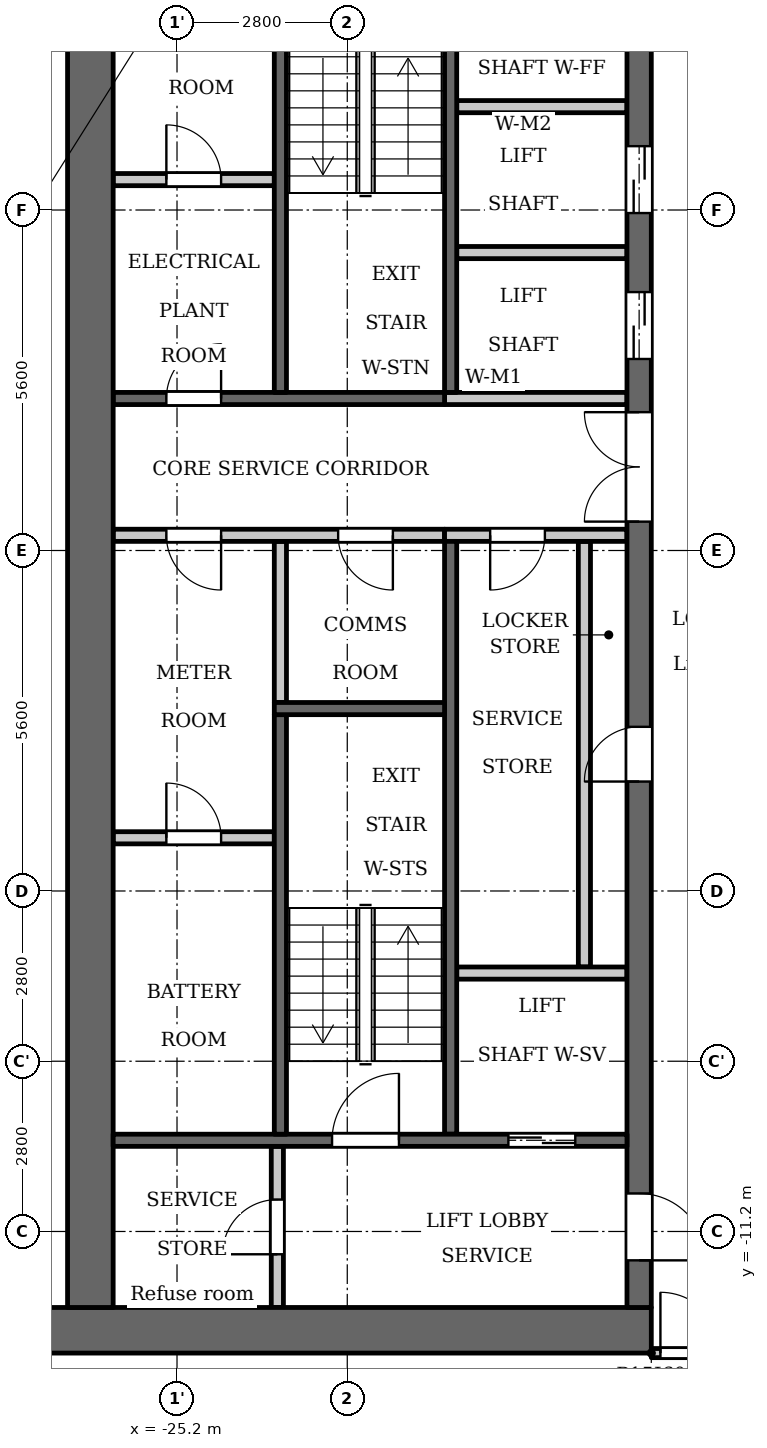
"""IFC4 building model, lengths in metres.
Left out: names, types, materials, properties, quantities, classifications, styles, units other than length and angle.
Written with IfcOpenShell. Run it as: python <this file> out.ifc"""

import sys

from ifc_helpers import new_model, si_unit, direction, frame, frame_2d, origin, place, context, subcontext, project, spatial, rectangle, extrude, element, fill, save


model = new_model("IFC4")
c1 = context("Model", 3, precision=1e-05, world=origin(), true_north=direction((0.0, 1.0)))
c2 = subcontext(c1, "Body", "Model", "MODEL_VIEW")
j1 = project(units=[si_unit("LENGTHUNIT", "METRE"), si_unit("PLANEANGLEUNIT", "RADIAN")], contexts=[c1])
p1 = place(None, origin())
s1 = spatial("IfcSite", under=j1, at=p1, CompositionType="ELEMENT")
p2 = place(p1, origin())
s2 = spatial("IfcBuilding", under=s1, at=p2, CompositionType="ELEMENT")
p3 = place(p2, frame((0.0, 0.0, 157.1)))
s3 = spatial("IfcBuildingStorey", under=s2, at=p3, CompositionType="ELEMENT", Elevation=157.1)
p4 = place(p3, frame((-23.5, -2.5, 0.0), z_axis=(0.0, 0.0, 1.0), x_axis=(0.0, 1.0, 0.0)))
e1 = element("IfcWall", 1, at=p4, inside=s3, PredefinedType="PARTITIONING", context=c2, shape_type="SweptSolid", body=[
    extrude(rectangle(XDim=2.65, YDim=0.2, at=frame_2d((1.325, 0.0))), origin(), (0.0, 0.0, 1.0), 3.2),
])
p5 = place(p3, frame((-20.7, 2.6, 0.0), z_axis=(0.0, 0.0, 1.0), x_axis=(0.0, 1.0, 0.0)))
e2 = element("IfcWall", 2, at=p5, inside=s3, PredefinedType="SHEAR", context=c2, shape_type="SweptSolid", body=[
    extrude(rectangle(XDim=7.0, YDim=0.2, at=frame_2d((3.5, 0.0))), origin(), (0.0, 0.0, 1.0), 3.2),
])
p6 = place(p3, frame((-20.7, -9.6, 0.0), z_axis=(0.0, 0.0, 1.0), x_axis=(0.0, 1.0, 0.0)))
e3 = element("IfcWall", 3, at=p6, inside=s3, PredefinedType="SHEAR", context=c2, shape_type="SweptSolid", body=[
    extrude(rectangle(XDim=9.75, YDim=0.2, at=frame_2d((4.875, 0.0))), origin(), (0.0, 0.0, 1.0), 3.2),
])
p7 = place(p3, frame((-20.8, 2.5, 0.0), z_axis=(0.0, 0.0, 1.0), x_axis=(-1.0, 0.0, 0.0)))
e4 = element("IfcWall", 4, at=p7, inside=s3, PredefinedType="SHEAR", context=c2, shape_type="SweptSolid", body=[
    extrude(rectangle(XDim=5.45, YDim=0.2, at=frame_2d((2.725, 0.0))), origin(), (0.0, 0.0, 1.0), 3.2),
])
p8 = place(p7, frame((3.675, 0.0, 0.0)))
e5 = element("IfcOpeningElement", 5, at=p8, cuts=e4, PredefinedType="OPENING", context=c2, shape_type="SweptSolid", body=[
    extrude(rectangle(XDim=0.9, YDim=2.1, at=frame_2d((0.45, 1.05))), frame((0.0, 0.11, 0.0), z_axis=(0.0, -1.0, 0.0), x_axis=(1.0, 0.0, 0.0)), (0.0, 0.0, 1.0), 0.22),
])
p9 = place(p3, frame((-20.8, 0.25, 0.0), z_axis=(0.0, 0.0, 1.0), x_axis=(-1.0, 0.0, 0.0)))
e6 = element("IfcWall", 6, at=p9, inside=s3, PredefinedType="PARTITIONING", context=c2, shape_type="SweptSolid", body=[
    extrude(rectangle(XDim=5.45, YDim=0.2, at=frame_2d((2.725, 0.0))), origin(), (0.0, 0.0, 1.0), 3.2),
])
p10 = place(p9, frame((0.85, 0.0, 0.0)))
e7 = element("IfcOpeningElement", 7, at=p10, cuts=e6, PredefinedType="OPENING", context=c2, shape_type="SweptSolid", body=[
    extrude(rectangle(XDim=0.9, YDim=2.1, at=frame_2d((0.45, 1.05))), frame((0.0, 0.11, 0.0), z_axis=(0.0, -1.0, 0.0), x_axis=(1.0, 0.0, 0.0)), (0.0, 0.0, 1.0), 0.22),
])
p11 = place(p9, frame((3.675, 0.0, 0.0)))
e8 = element("IfcOpeningElement", 8, at=p11, cuts=e6, PredefinedType="OPENING", context=c2, shape_type="SweptSolid", body=[
    extrude(rectangle(XDim=0.9, YDim=2.1, at=frame_2d((0.45, 1.05))), frame((0.0, 0.11, 0.0), z_axis=(0.0, -1.0, 0.0), x_axis=(1.0, 0.0, 0.0)), (0.0, 0.0, 1.0), 0.22),
])
p12 = place(p3, frame((-17.4, -12.825, 0.0), z_axis=(0.0, 0.0, 1.0), x_axis=(-1.0, 0.0, 0.0)))
e9 = element("IfcWall", 9, at=p12, inside=s3, PredefinedType="SHEAR", context=c2, shape_type="SweptSolid", body=[
    extrude(rectangle(XDim=10.4, YDim=0.75, at=frame_2d((5.2, 0.0))), origin(), (0.0, 0.0, 1.0), 3.2),
])
p13 = place(p3, frame((-18.5, -6.85, 0.0), z_axis=(0.0, 0.0, 1.0), x_axis=(0.0, 1.0, 0.0)))
e10 = element("IfcWall", 10, at=p13, inside=s3, PredefinedType="PARTITIONING", context=c2, shape_type="SweptSolid", body=[
    extrude(rectangle(XDim=7.0, YDim=0.2, at=frame_2d((3.5, 0.0))), origin(), (0.0, 0.0, 1.0), 3.2),
])
p14 = place(p3, frame((-17.6, -12.45, 0.0), z_axis=(0.0, 0.0, 1.0), x_axis=(0.0, 1.0, 0.0)))
e11 = element("IfcWall", 11, at=p14, inside=s3, PredefinedType="SHEAR", context=c2, shape_type="SweptSolid", body=[
    extrude(rectangle(XDim=24.9, YDim=0.4, at=frame_2d((12.45, 0.0))), origin(), (0.0, 0.0, 1.0), 3.2),
])
p15 = place(p14, frame((8.65, 0.0, 0.0)))
e12 = element("IfcOpeningElement", 12, at=p15, cuts=e11, PredefinedType="OPENING", context=c2, shape_type="SweptSolid", body=[
    extrude(rectangle(XDim=0.9, YDim=2.1, at=frame_2d((0.45, 1.05))), frame((0.0, 0.21, 0.0), z_axis=(0.0, -1.0, 0.0), x_axis=(1.0, 0.0, 0.0)), (0.0, 0.0, 1.0), 0.42),
])
p16 = place(p14, frame((15.6, 0.0, 0.0)))
e13 = element("IfcOpeningElement", 13, at=p16, cuts=e11, PredefinedType="OPENING", context=c2, shape_type="SweptSolid", body=[
    extrude(rectangle(XDim=1.1, YDim=2.1, at=frame_2d((0.55, 1.05))), frame((0.0, 0.21, 0.0), z_axis=(0.0, -1.0, 0.0), x_axis=(1.0, 0.0, 0.0)), (0.0, 0.0, 1.0), 0.42),
])
p17 = place(p14, frame((18.0, 0.0, 0.0)))
e14 = element("IfcOpeningElement", 14, at=p17, cuts=e11, PredefinedType="OPENING", context=c2, shape_type="SweptSolid", body=[
    extrude(rectangle(XDim=1.1, YDim=2.1, at=frame_2d((0.55, 1.05))), frame((0.0, 0.21, 0.0), z_axis=(0.0, -1.0, 0.0), x_axis=(1.0, 0.0, 0.0)), (0.0, 0.0, 1.0), 0.42),
])
p18 = place(p14, frame((23.025, 0.0, 0.0)))
e15 = element("IfcOpeningElement", 15, at=p18, cuts=e11, PredefinedType="OPENING", context=c2, shape_type="SweptSolid", body=[
    extrude(rectangle(XDim=1.1, YDim=2.1, at=frame_2d((0.55, 1.05))), frame((0.0, 0.21, 0.0), z_axis=(0.0, -1.0, 0.0), x_axis=(1.0, 0.0, 0.0)), (0.0, 0.0, 1.0), 0.42),
])
p19 = place(p14, frame((0.775, 0.0, 0.0)))
e16 = element("IfcOpeningElement", 16, at=p19, cuts=e11, PredefinedType="OPENING", context=c2, shape_type="SweptSolid", body=[
    extrude(rectangle(XDim=1.1, YDim=2.1, at=frame_2d((0.55, 1.05))), frame((0.0, 0.21, 0.0), z_axis=(0.0, -1.0, 0.0), x_axis=(1.0, 0.0, 0.0)), (0.0, 0.0, 1.0), 0.42),
])
p20 = place(p14, frame((12.925, 0.0, 0.0)))
e17 = element("IfcOpeningElement", 17, at=p20, cuts=e11, PredefinedType="OPENING", context=c2, shape_type="SweptSolid", body=[
    extrude(rectangle(XDim=1.8, YDim=2.1, at=frame_2d((0.9, 1.05))), frame((0.0, 0.21, 0.0), z_axis=(0.0, -1.0, 0.0), x_axis=(1.0, 0.0, 0.0)), (0.0, 0.0, 1.0), 0.42),
])
p21 = place(p3, frame((-26.625, -12.45, 0.0), z_axis=(0.0, 0.0, 1.0), x_axis=(0.0, 1.0, 0.0)))
e18 = element("IfcWall", 18, at=p21, inside=s3, PredefinedType="SHEAR", context=c2, shape_type="SweptSolid", body=[
    extrude(rectangle(XDim=24.9, YDim=0.75, at=frame_2d((12.45, 0.0))), origin(), (0.0, 0.0, 1.0), 3.2),
])
p22 = place(p3, frame((-23.55, -12.45, 0.0), z_axis=(0.0, 0.0, 1.0), x_axis=(0.0, 1.0, 0.0)))
e19 = element("IfcWall", 19, at=p22, inside=s3, PredefinedType="PARTITIONING", context=c2, shape_type="SweptSolid", body=[
    extrude(rectangle(XDim=2.65, YDim=0.2, at=frame_2d((1.325, 0.0))), origin(), (0.0, 0.0, 1.0), 3.2),
])
p23 = place(p22, frame((0.875, 0.0, 0.0)))
e20 = element("IfcOpeningElement", 20, at=p23, cuts=e19, PredefinedType="OPENING", context=c2, shape_type="SweptSolid", body=[
    extrude(rectangle(XDim=0.9, YDim=2.1, at=frame_2d((0.45, 1.05))), frame((0.0, 0.11, 0.0), z_axis=(0.0, -1.0, 0.0), x_axis=(1.0, 0.0, 0.0)), (0.0, 0.0, 1.0), 0.22),
])
p24 = place(p3, frame((-23.6, -4.725, 0.0), z_axis=(0.0, 0.0, 1.0), x_axis=(-1.0, 0.0, 0.0)))
e21 = element("IfcWall", 21, at=p24, inside=s3, PredefinedType="PARTITIONING", context=c2, shape_type="SweptSolid", body=[
    extrude(rectangle(XDim=2.65, YDim=0.2, at=frame_2d((1.325, 0.0))), origin(), (0.0, 0.0, 1.0), 3.2),
])
p25 = place(p24, frame((0.875, 0.0, 0.0)))
e22 = element("IfcOpeningElement", 22, at=p25, cuts=e21, PredefinedType="OPENING", context=c2, shape_type="SweptSolid", body=[
    extrude(rectangle(XDim=0.9, YDim=2.1, at=frame_2d((0.45, 1.05))), frame((0.0, 0.11, 0.0), z_axis=(0.0, -1.0, 0.0), x_axis=(1.0, 0.0, 0.0)), (0.0, 0.0, 1.0), 0.22),
])
p26 = place(p3, frame((-23.6, 6.1, 0.0), z_axis=(0.0, 0.0, 1.0), x_axis=(-1.0, 0.0, 0.0)))
e23 = element("IfcWall", 23, at=p26, inside=s3, PredefinedType="PARTITIONING", context=c2, shape_type="SweptSolid", body=[
    extrude(rectangle(XDim=2.65, YDim=0.2, at=frame_2d((1.325, 0.0))), origin(), (0.0, 0.0, 1.0), 3.2),
])
p27 = place(p26, frame((0.875, 0.0, 0.0)))
e24 = element("IfcOpeningElement", 24, at=p27, cuts=e23, PredefinedType="OPENING", context=c2, shape_type="SweptSolid", body=[
    extrude(rectangle(XDim=0.9, YDim=2.1, at=frame_2d((0.45, 1.05))), frame((0.0, 0.11, 0.0), z_axis=(0.0, -1.0, 0.0), x_axis=(1.0, 0.0, 0.0)), (0.0, 0.0, 1.0), 0.22),
])
p28 = place(p3, frame((-17.8, -9.7, 0.0), z_axis=(0.0, 0.0, 1.0), x_axis=(-1.0, 0.0, 0.0)))
e25 = element("IfcWall", 25, at=p28, inside=s3, PredefinedType="SHEAR", context=c2, shape_type="SweptSolid", body=[
    extrude(rectangle(XDim=8.45, YDim=0.2, at=frame_2d((4.225, 0.0))), origin(), (0.0, 0.0, 1.0), 3.2),
])
p29 = place(p28, frame((0.85, 0.0, 0.0)))
e26 = element("IfcOpeningElement", 26, at=p29, cuts=e25, PredefinedType="OPENING", context=c2, shape_type="SweptSolid", body=[
    extrude(rectangle(XDim=1.1, YDim=2.1, at=frame_2d((0.55, 1.05))), frame((0.0, 0.11, 0.0), z_axis=(0.0, -1.0, 0.0), x_axis=(1.0, 0.0, 0.0)), (0.0, 0.0, 1.0), 0.22),
])
p30 = place(p28, frame((3.75, 0.0, 0.0)))
e27 = element("IfcOpeningElement", 27, at=p30, cuts=e25, PredefinedType="OPENING", context=c2, shape_type="SweptSolid", body=[
    extrude(rectangle(XDim=1.1, YDim=2.1, at=frame_2d((0.55, 1.05))), frame((0.0, 0.11, 0.0), z_axis=(0.0, -1.0, 0.0), x_axis=(1.0, 0.0, 0.0)), (0.0, 0.0, 1.0), 0.22),
])
p31 = place(p3, frame((-17.8, -6.95, 0.0), z_axis=(0.0, 0.0, 1.0), x_axis=(-1.0, 0.0, 0.0)))
e28 = element("IfcWall", 28, at=p31, inside=s3, PredefinedType="PARTITIONING", context=c2, shape_type="SweptSolid", body=[
    extrude(rectangle(XDim=2.8, YDim=0.2, at=frame_2d((1.4, 0.0))), origin(), (0.0, 0.0, 1.0), 3.2),
])
p32 = place(p3, frame((-17.8, 0.25, 0.0), z_axis=(0.0, 0.0, 1.0), x_axis=(-1.0, 0.0, 0.0)))
e29 = element("IfcWall", 29, at=p32, inside=s3, PredefinedType="PARTITIONING", context=c2, shape_type="SweptSolid", body=[
    extrude(rectangle(XDim=3.0, YDim=0.2, at=frame_2d((1.5, 0.0))), origin(), (0.0, 0.0, 1.0), 3.2),
])
p33 = place(p32, frame((1.35, 0.0, 0.0)))
e30 = element("IfcOpeningElement", 30, at=p33, cuts=e29, PredefinedType="OPENING", context=c2, shape_type="SweptSolid", body=[
    extrude(rectangle(XDim=0.9, YDim=2.1, at=frame_2d((0.45, 1.05))), frame((0.0, 0.11, 0.0), z_axis=(0.0, -1.0, 0.0), x_axis=(1.0, 0.0, 0.0)), (0.0, 0.0, 1.0), 0.22),
])
p34 = place(p3, frame((-17.8, 2.5, 0.0), z_axis=(0.0, 0.0, 1.0), x_axis=(-1.0, 0.0, 0.0)))
e31 = element("IfcWall", 31, at=p34, inside=s3, PredefinedType="PARTITIONING", context=c2, shape_type="SweptSolid", body=[
    extrude(rectangle(XDim=3.0, YDim=0.2, at=frame_2d((1.5, 0.0))), origin(), (0.0, 0.0, 1.0), 3.2),
])
for number, where, z_axis, x_axis in (
    (32, (-17.8, 4.9, 0.0), (0.0, 0.0, 1.0), (-1.0, 0.0, 0.0)),
    (33, (-17.8, 7.3, 0.0), (0.0, 0.0, 1.0), (-1.0, 0.0, 0.0)),
):
    element("IfcWall", number, at=place(p3, frame(where, z_axis=z_axis, x_axis=x_axis)), inside=s3, PredefinedType="PARTITIONING", context=c2, shape_type="SweptSolid", body=[
        extrude(rectangle(XDim=2.8, YDim=0.2, at=frame_2d((1.4, 0.0))), origin(), (0.0, 0.0, 1.0), 3.2),
    ])
p35 = place(p3, frame((-23.5, 2.6, 0.0), z_axis=(0.0, 0.0, 1.0), x_axis=(0.0, 1.0, 0.0)))
e34 = element("IfcWall", 34, at=p35, inside=s3, PredefinedType="SHEAR", context=c2, shape_type="SweptSolid", body=[
    extrude(rectangle(XDim=7.0, YDim=0.2, at=frame_2d((3.5, 0.0))), origin(), (0.0, 0.0, 1.0), 3.2),
])
p36 = place(p3, frame((-23.5, -9.6, 0.0), z_axis=(0.0, 0.0, 1.0), x_axis=(0.0, 1.0, 0.0)))
e35 = element("IfcWall", 35, at=p36, inside=s3, PredefinedType="SHEAR", context=c2, shape_type="SweptSolid", body=[
    extrude(rectangle(XDim=6.9, YDim=0.2, at=frame_2d((3.45, 0.0))), origin(), (0.0, 0.0, 1.0), 3.2),
])
p37 = place(p3, frame((-20.8, -2.6, 0.0), z_axis=(0.0, 0.0, 1.0), x_axis=(-1.0, 0.0, 0.0)))
e36 = element("IfcWall", 36, at=p37, inside=s3, PredefinedType="SHEAR", context=c2, shape_type="SweptSolid", body=[
    extrude(rectangle(XDim=2.8, YDim=0.2, at=frame_2d((1.4, 0.0))), origin(), (0.0, 0.0, 1.0), 3.2),
])
p38 = place(p3, frame((-17.4, -13.2, 0.0), z_axis=(0.0, 0.0, 1.0), x_axis=(1.0, 0.0, 0.0)))
e37 = element("IfcWall", 37, at=p38, inside=s3, PredefinedType="PARTITIONING", context=c2, shape_type="SweptSolid", body=[
    extrude(rectangle(XDim=34.8, YDim=0.15, at=frame_2d((17.4, 0.0))), origin(), (0.0, 0.0, 1.0), 3.2),
])
p39 = place(p38, frame((0.15, 0.0, 0.0)))
e38 = element("IfcOpeningElement", 38, at=p39, cuts=e37, PredefinedType="OPENING", context=c2, shape_type="SweptSolid", body=[
    extrude(rectangle(XDim=1.0, YDim=2.1, at=frame_2d((0.5, 1.05))), frame((0.0, 0.085, 0.0), z_axis=(0.0, -1.0, 0.0), x_axis=(1.0, 0.0, 0.0)), (0.0, 0.0, 1.0), 0.17),
])
p40 = place(p38, frame((33.55, 0.0, 0.0)))
e39 = element("IfcOpeningElement", 39, at=p40, cuts=e37, PredefinedType="OPENING", context=c2, shape_type="SweptSolid", body=[
    extrude(rectangle(XDim=1.0, YDim=2.1, at=frame_2d((0.5, 1.05))), frame((0.0, 0.085, 0.0), z_axis=(0.0, -1.0, 0.0), x_axis=(1.0, 0.0, 0.0)), (0.0, 0.0, 1.0), 0.17),
])
p41 = place(p38, frame((3.5, 0.0, 0.0)))
e40 = element("IfcOpeningElement", 40, at=p41, cuts=e37, PredefinedType="OPENING", context=c2, shape_type="SweptSolid", body=[
    extrude(rectangle(XDim=1.0, YDim=2.1, at=frame_2d((0.5, 1.05))), frame((0.0, 0.085, 0.0), z_axis=(0.0, -1.0, 0.0), x_axis=(1.0, 0.0, 0.0)), (0.0, 0.0, 1.0), 0.17),
])
p42 = place(p38, frame((10.1, 0.0, 0.0)))
e41 = element("IfcOpeningElement", 41, at=p42, cuts=e37, PredefinedType="OPENING", context=c2, shape_type="SweptSolid", body=[
    extrude(rectangle(XDim=1.0, YDim=2.1, at=frame_2d((0.5, 1.05))), frame((0.0, 0.085, 0.0), z_axis=(0.0, -1.0, 0.0), x_axis=(1.0, 0.0, 0.0)), (0.0, 0.0, 1.0), 0.17),
])
p43 = place(p38, frame((15.7, 0.0, 0.0)))
e42 = element("IfcOpeningElement", 42, at=p43, cuts=e37, PredefinedType="OPENING", context=c2, shape_type="SweptSolid", body=[
    extrude(rectangle(XDim=1.0, YDim=2.1, at=frame_2d((0.5, 1.05))), frame((0.0, 0.085, 0.0), z_axis=(0.0, -1.0, 0.0), x_axis=(1.0, 0.0, 0.0)), (0.0, 0.0, 1.0), 0.17),
])
p44 = place(p38, frame((18.05, 0.0, 0.0)))
e43 = element("IfcOpeningElement", 43, at=p44, cuts=e37, PredefinedType="OPENING", context=c2, shape_type="SweptSolid", body=[
    extrude(rectangle(XDim=1.0, YDim=2.1, at=frame_2d((0.5, 1.05))), frame((0.0, 0.085, 0.0), z_axis=(0.0, -1.0, 0.0), x_axis=(1.0, 0.0, 0.0)), (0.0, 0.0, 1.0), 0.17),
])
p45 = place(p38, frame((26.9, 0.0, 0.0)))
e44 = element("IfcOpeningElement", 44, at=p45, cuts=e37, PredefinedType="OPENING", context=c2, shape_type="SweptSolid", body=[
    extrude(rectangle(XDim=1.0, YDim=2.1, at=frame_2d((0.5, 1.05))), frame((0.0, 0.085, 0.0), z_axis=(0.0, -1.0, 0.0), x_axis=(1.0, 0.0, 0.0)), (0.0, 0.0, 1.0), 0.17),
])
p46 = place(p29, origin())
e45 = element("IfcDoor", 45, at=p46, inside=s3, OperationType="DOUBLE_DOOR_SLIDING", PredefinedType="DOOR", context=c2, shape_type="SweptSolid", body=[
    extrude(rectangle(XDim=1.1, YDim=2.1, at=frame_2d((0.55, 1.05))), frame((0.0, 0.025, 0.0), z_axis=(0.0, -1.0, 0.0), x_axis=(1.0, 0.0, 0.0)), (0.0, 0.0, 1.0), 0.05),
])
fill(e26, e45)
p47 = place(p15, origin())
e46 = element("IfcDoor", 46, at=p47, inside=s3, OperationType="SINGLE_SWING_RIGHT", PredefinedType="DOOR", context=c2, shape_type="SweptSolid", body=[
    extrude(rectangle(XDim=0.9, YDim=2.1, at=frame_2d((0.45, 1.05))), frame((0.0, 0.025, 0.0), z_axis=(0.0, -1.0, 0.0), x_axis=(1.0, 0.0, 0.0)), (0.0, 0.0, 1.0), 0.05),
])
fill(e12, e46)
p48 = place(p33, origin())
e47 = element("IfcDoor", 47, at=p48, inside=s3, OperationType="SINGLE_SWING_LEFT", PredefinedType="DOOR", context=c2, shape_type="SweptSolid", body=[
    extrude(rectangle(XDim=0.9, YDim=2.1, at=frame_2d((0.45, 1.05))), frame((0.0, 0.025, 0.0), z_axis=(0.0, -1.0, 0.0), x_axis=(1.0, 0.0, 0.0)), (0.0, 0.0, 1.0), 0.05),
])
fill(e30, e47)
p49 = place(p16, origin())
e48 = element("IfcDoor", 48, at=p49, inside=s3, OperationType="DOUBLE_DOOR_SLIDING", PredefinedType="DOOR", context=c2, shape_type="SweptSolid", body=[
    extrude(rectangle(XDim=1.1, YDim=2.1, at=frame_2d((0.55, 1.05))), frame((0.0, 0.025, 0.0), z_axis=(0.0, -1.0, 0.0), x_axis=(1.0, 0.0, 0.0)), (0.0, 0.0, 1.0), 0.05),
])
fill(e13, e48)
p50 = place(p17, origin())
e49 = element("IfcDoor", 49, at=p50, inside=s3, OperationType="DOUBLE_DOOR_SLIDING", PredefinedType="DOOR", context=c2, shape_type="SweptSolid", body=[
    extrude(rectangle(XDim=1.1, YDim=2.1, at=frame_2d((0.55, 1.05))), frame((0.0, 0.025, 0.0), z_axis=(0.0, -1.0, 0.0), x_axis=(1.0, 0.0, 0.0)), (0.0, 0.0, 1.0), 0.05),
])
fill(e14, e49)
p51 = place(p19, origin())
e50 = element("IfcDoor", 50, at=p51, inside=s3, OperationType="SINGLE_SWING_LEFT", PredefinedType="DOOR", context=c2, shape_type="SweptSolid", body=[
    extrude(rectangle(XDim=1.1, YDim=2.1, at=frame_2d((0.55, 1.05))), frame((0.0, 0.025, 0.0), z_axis=(0.0, -1.0, 0.0), x_axis=(1.0, 0.0, 0.0)), (0.0, 0.0, 1.0), 0.05),
])
fill(e16, e50)
p52 = place(p23, origin())
e51 = element("IfcDoor", 51, at=p52, inside=s3, OperationType="SINGLE_SWING_RIGHT", PredefinedType="DOOR", context=c2, shape_type="SweptSolid", body=[
    extrude(rectangle(XDim=0.9, YDim=2.1, at=frame_2d((0.45, 1.05))), frame((0.0, 0.025, 0.0), z_axis=(0.0, -1.0, 0.0), x_axis=(1.0, 0.0, 0.0)), (0.0, 0.0, 1.0), 0.05),
])
fill(e20, e51)
p53 = place(p30, origin())
e52 = element("IfcDoor", 52, at=p53, inside=s3, OperationType="SINGLE_SWING_LEFT", PredefinedType="DOOR", context=c2, shape_type="SweptSolid", body=[
    extrude(rectangle(XDim=1.1, YDim=2.1, at=frame_2d((0.55, 1.05))), frame((0.0, 0.025, 0.0), z_axis=(0.0, -1.0, 0.0), x_axis=(1.0, 0.0, 0.0)), (0.0, 0.0, 1.0), 0.05),
])
fill(e27, e52)
p54 = place(p20, origin())
e53 = element("IfcDoor", 53, at=p54, inside=s3, OperationType="DOUBLE_DOOR_SINGLE_SWING", PredefinedType="DOOR", context=c2, shape_type="SweptSolid", body=[
    extrude(rectangle(XDim=1.8, YDim=2.1, at=frame_2d((0.9, 1.05))), frame((0.0, 0.025, 0.0), z_axis=(0.0, -1.0, 0.0), x_axis=(1.0, 0.0, 0.0)), (0.0, 0.0, 1.0), 0.05),
])
fill(e17, e53)
p55 = place(p10, origin())
e54 = element("IfcDoor", 54, at=p55, inside=s3, OperationType="SINGLE_SWING_RIGHT", PredefinedType="DOOR", context=c2, shape_type="SweptSolid", body=[
    extrude(rectangle(XDim=0.9, YDim=2.1, at=frame_2d((0.45, 1.05))), frame((0.0, 0.025, 0.0), z_axis=(0.0, -1.0, 0.0), x_axis=(1.0, 0.0, 0.0)), (0.0, 0.0, 1.0), 0.05),
])
fill(e7, e54)
p56 = place(p25, origin())
e55 = element("IfcDoor", 55, at=p56, inside=s3, OperationType="SINGLE_SWING_RIGHT", PredefinedType="DOOR", context=c2, shape_type="SweptSolid", body=[
    extrude(rectangle(XDim=0.9, YDim=2.1, at=frame_2d((0.45, 1.05))), frame((0.0, 0.025, 0.0), z_axis=(0.0, -1.0, 0.0), x_axis=(1.0, 0.0, 0.0)), (0.0, 0.0, 1.0), 0.05),
])
fill(e22, e55)
p57 = place(p11, origin())
e56 = element("IfcDoor", 56, at=p57, inside=s3, OperationType="SINGLE_SWING_RIGHT", PredefinedType="DOOR", context=c2, shape_type="SweptSolid", body=[
    extrude(rectangle(XDim=0.9, YDim=2.1, at=frame_2d((0.45, 1.05))), frame((0.0, 0.025, 0.0), z_axis=(0.0, -1.0, 0.0), x_axis=(1.0, 0.0, 0.0)), (0.0, 0.0, 1.0), 0.05),
])
fill(e8, e56)
p58 = place(p27, origin())
e57 = element("IfcDoor", 57, at=p58, inside=s3, OperationType="SINGLE_SWING_RIGHT", PredefinedType="DOOR", context=c2, shape_type="SweptSolid", body=[
    extrude(rectangle(XDim=0.9, YDim=2.1, at=frame_2d((0.45, 1.05))), frame((0.0, 0.025, 0.0), z_axis=(0.0, -1.0, 0.0), x_axis=(1.0, 0.0, 0.0)), (0.0, 0.0, 1.0), 0.05),
])
fill(e24, e57)
p59 = place(p8, origin())
e58 = element("IfcDoor", 58, at=p59, inside=s3, OperationType="SINGLE_SWING_LEFT", PredefinedType="DOOR", context=c2, shape_type="SweptSolid", body=[
    extrude(rectangle(XDim=0.9, YDim=2.1, at=frame_2d((0.45, 1.05))), frame((0.0, 0.025, 0.0), z_axis=(0.0, -1.0, 0.0), x_axis=(1.0, 0.0, 0.0)), (0.0, 0.0, 1.0), 0.05),
])
fill(e5, e58)
p60 = place(p39, origin())
e59 = element("IfcDoor", 59, at=p60, inside=s3, OperationType="SINGLE_SWING_RIGHT", PredefinedType="DOOR", context=c2, shape_type="SweptSolid", body=[
    extrude(rectangle(XDim=1.0, YDim=2.1, at=frame_2d((0.5, 1.05))), frame((0.0, 0.025, 0.0), z_axis=(0.0, -1.0, 0.0), x_axis=(1.0, 0.0, 0.0)), (0.0, 0.0, 1.0), 0.05),
])
fill(e38, e59)
save(model, sys.argv[1])
